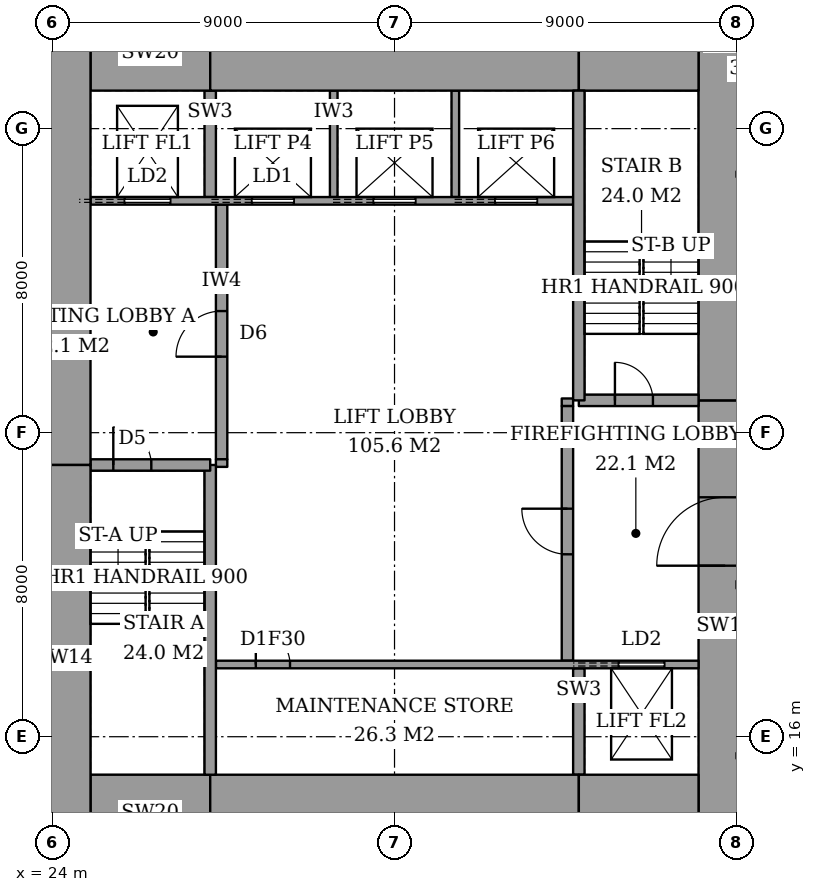
"""IFC4 building model, lengths in metres.
Left out: names, types, materials, properties, quantities, classifications, styles, units other than length and angle.
Written with IfcOpenShell. Run it as: python <this file> out.ifc"""

import sys

from ifc_helpers import new_model, si_unit, direction, frame, frame_2d, origin, place, context, subcontext, project, spatial, rectangle, extrude, element, fill, save


model = new_model("IFC4")
c1 = context("Model", 3, precision=1e-05, world=origin(), true_north=direction((0.0, 1.0)))
c2 = subcontext(c1, "Body", "Model", "MODEL_VIEW")
j1 = project(units=[si_unit("LENGTHUNIT", "METRE"), si_unit("PLANEANGLEUNIT", "RADIAN")], contexts=[c1])
p1 = place(None, origin())
s1 = spatial("IfcSite", under=j1, at=p1, CompositionType="ELEMENT")
p2 = place(p1, origin())
s2 = spatial("IfcBuilding", under=s1, at=p2, CompositionType="ELEMENT")
p3 = place(p2, frame((0.0, 0.0, 266.4)))
s3 = spatial("IfcBuildingStorey", under=s2, at=p3, CompositionType="ELEMENT", Elevation=266.4)
p4 = place(p3, frame((25.0, 14.0, 0.0), z_axis=(0.0, 0.0, 1.0), x_axis=(1.0, 0.0, 0.0)))
e1 = element("IfcWall", 1, at=p4, inside=s3, PredefinedType="SHEAR", context=c2, shape_type="SweptSolid", body=[
    extrude(rectangle(XDim=3.15, YDim=2.0, at=frame_2d((1.575, 0.0))), origin(), (0.0, 0.0, 1.0), 3.6),
])
p5 = place(p3, frame((28.15, 14.0, 0.0), z_axis=(0.0, 0.0, 1.0), x_axis=(1.0, 0.0, 0.0)))
e2 = element("IfcWall", 2, at=p5, inside=s3, PredefinedType="SHEAR", context=c2, shape_type="SweptSolid", body=[
    extrude(rectangle(XDim=9.7, YDim=2.0, at=frame_2d((4.85, 0.0))), origin(), (0.0, 0.0, 1.0), 3.6),
])
for number, where, z_axis, x_axis in (
    (3, (37.85, 14.0, 0.0), (0.0, 0.0, 1.0), (1.0, 0.0, 0.0)),
    (4, (25.0, 34.0, 0.0), (0.0, 0.0, 1.0), (1.0, 0.0, 0.0)),
):
    element("IfcWall", number, at=place(p3, frame(where, z_axis=z_axis, x_axis=x_axis)), inside=s3, PredefinedType="SHEAR", context=c2, shape_type="SweptSolid", body=[
        extrude(rectangle(XDim=3.15, YDim=2.0, at=frame_2d((1.575, 0.0))), origin(), (0.0, 0.0, 1.0), 3.6),
    ])
p6 = place(p3, frame((28.15, 34.0, 0.0), z_axis=(0.0, 0.0, 1.0), x_axis=(1.0, 0.0, 0.0)))
e5 = element("IfcWall", 5, at=p6, inside=s3, PredefinedType="SHEAR", context=c2, shape_type="SweptSolid", body=[
    extrude(rectangle(XDim=9.7, YDim=2.0, at=frame_2d((4.85, 0.0))), origin(), (0.0, 0.0, 1.0), 3.6),
])
p7 = place(p3, frame((37.85, 34.0, 0.0), z_axis=(0.0, 0.0, 1.0), x_axis=(1.0, 0.0, 0.0)))
e6 = element("IfcWall", 6, at=p7, inside=s3, PredefinedType="SHEAR", context=c2, shape_type="SweptSolid", body=[
    extrude(rectangle(XDim=3.15, YDim=2.0, at=frame_2d((1.575, 0.0))), origin(), (0.0, 0.0, 1.0), 3.6),
])
p8 = place(p3, frame((24.3, 13.0, 0.0), z_axis=(0.0, 0.0, 1.0), x_axis=(0.0, 1.0, 0.0)))
e7 = element("IfcWall", 7, at=p8, inside=s3, PredefinedType="SHEAR", context=c2, shape_type="SweptSolid", body=[
    extrude(rectangle(XDim=10.15, YDim=1.4, at=frame_2d((5.075, 0.0))), origin(), (0.0, 0.0, 1.0), 3.6),
])
p9 = place(p3, frame((24.3, 23.15, 0.0), z_axis=(0.0, 0.0, 1.0), x_axis=(0.0, 1.0, 0.0)))
e8 = element("IfcWall", 8, at=p9, inside=s3, PredefinedType="SHEAR", context=c2, shape_type="SweptSolid", body=[
    extrude(rectangle(XDim=11.85, YDim=1.4, at=frame_2d((5.925, 0.0))), origin(), (0.0, 0.0, 1.0), 3.6),
])
p10 = place(p3, frame((41.7, 13.0, 0.0), z_axis=(0.0, 0.0, 1.0), x_axis=(0.0, 1.0, 0.0)))
e9 = element("IfcWall", 9, at=p10, inside=s3, PredefinedType="SHEAR", context=c2, shape_type="SweptSolid", body=[
    extrude(rectangle(XDim=11.85, YDim=1.4, at=frame_2d((5.925, 0.0))), origin(), (0.0, 0.0, 1.0), 3.6),
])
p11 = place(p10, frame((7.5, 0.0, 0.0)))
e10 = element("IfcOpeningElement", 10, at=p11, cuts=e9, PredefinedType="OPENING", context=c2, shape_type="SweptSolid", body=[
    extrude(rectangle(XDim=1.8, YDim=2.4, at=frame_2d((0.9, 1.2))), frame((0.0, 0.71, 0.0), z_axis=(0.0, -1.0, 0.0), x_axis=(1.0, 0.0, 0.0)), (0.0, 0.0, 1.0), 1.42),
])
p12 = place(p3, frame((41.7, 24.85, 0.0), z_axis=(0.0, 0.0, 1.0), x_axis=(0.0, 1.0, 0.0)))
e11 = element("IfcWall", 11, at=p12, inside=s3, PredefinedType="SHEAR", context=c2, shape_type="SweptSolid", body=[
    extrude(rectangle(XDim=10.15, YDim=1.4, at=frame_2d((5.075, 0.0))), origin(), (0.0, 0.0, 1.0), 3.6),
])
p13 = place(p3, frame((28.15, 15.0, 0.0), z_axis=(0.0, 0.0, 1.0), x_axis=(0.0, 1.0, 0.0)))
e12 = element("IfcWall", 12, at=p13, inside=s3, PredefinedType="SHEAR", context=c2, shape_type="SweptSolid", body=[
    extrude(rectangle(XDim=8.15, YDim=0.3, at=frame_2d((4.075, 0.0))), origin(), (0.0, 0.0, 1.0), 3.6),
])
p14 = place(p3, frame((25.0, 23.15, 0.0), z_axis=(0.0, 0.0, 1.0), x_axis=(1.0, 0.0, 0.0)))
e13 = element("IfcWall", 13, at=p14, inside=s3, PredefinedType="SHEAR", context=c2, shape_type="SweptSolid", body=[
    extrude(rectangle(XDim=3.15, YDim=0.3, at=frame_2d((1.575, 0.0))), origin(), (0.0, 0.0, 1.0), 3.6),
])
p15 = place(p14, frame((0.6, 0.0, 0.0)))
e14 = element("IfcOpeningElement", 14, at=p15, cuts=e13, PredefinedType="OPENING", context=c2, shape_type="SweptSolid", body=[
    extrude(rectangle(XDim=1.0, YDim=2.1, at=frame_2d((0.5, 1.05))), frame((0.0, 0.16, 0.0), z_axis=(0.0, -1.0, 0.0), x_axis=(1.0, 0.0, 0.0)), (0.0, 0.0, 1.0), 0.32),
])
p16 = place(p3, frame((37.85, 24.85, 0.0), z_axis=(0.0, 0.0, 1.0), x_axis=(0.0, 1.0, 0.0)))
e15 = element("IfcWall", 15, at=p16, inside=s3, PredefinedType="SHEAR", context=c2, shape_type="SweptSolid", body=[
    extrude(rectangle(XDim=8.15, YDim=0.3, at=frame_2d((4.075, 0.0))), origin(), (0.0, 0.0, 1.0), 3.6),
])
p17 = place(p3, frame((37.85, 24.85, 0.0), z_axis=(0.0, 0.0, 1.0), x_axis=(1.0, 0.0, 0.0)))
e16 = element("IfcWall", 16, at=p17, inside=s3, PredefinedType="SHEAR", context=c2, shape_type="SweptSolid", body=[
    extrude(rectangle(XDim=3.15, YDim=0.3, at=frame_2d((1.575, 0.0))), origin(), (0.0, 0.0, 1.0), 3.6),
])
p18 = place(p17, frame((0.95, 0.0, 0.0)))
e17 = element("IfcOpeningElement", 17, at=p18, cuts=e16, PredefinedType="OPENING", context=c2, shape_type="SweptSolid", body=[
    extrude(rectangle(XDim=1.0, YDim=2.1, at=frame_2d((0.5, 1.05))), frame((0.0, 0.16, 0.0), z_axis=(0.0, -1.0, 0.0), x_axis=(1.0, 0.0, 0.0)), (0.0, 0.0, 1.0), 0.32),
])
p19 = place(p3, frame((28.45, 23.3, 0.0), z_axis=(0.0, 0.0, 1.0), x_axis=(0.0, 1.0, 0.0)))
e18 = element("IfcWall", 18, at=p19, inside=s3, PredefinedType="PARTITIONING", context=c2, shape_type="SweptSolid", body=[
    extrude(rectangle(XDim=6.7, YDim=0.3, at=frame_2d((3.35, 0.0))), origin(), (0.0, 0.0, 1.0), 3.6),
])
p20 = place(p19, frame((2.7, 0.0, 0.0)))
e19 = element("IfcOpeningElement", 19, at=p20, cuts=e18, PredefinedType="OPENING", context=c2, shape_type="SweptSolid", body=[
    extrude(rectangle(XDim=1.2, YDim=2.1, at=frame_2d((0.6, 1.05))), frame((0.0, 0.16, 0.0), z_axis=(0.0, -1.0, 0.0), x_axis=(1.0, 0.0, 0.0)), (0.0, 0.0, 1.0), 0.32),
])
p21 = place(p3, frame((37.55, 18.0, 0.0), z_axis=(0.0, 0.0, 1.0), x_axis=(0.0, 1.0, 0.0)))
e20 = element("IfcWall", 20, at=p21, inside=s3, PredefinedType="PARTITIONING", context=c2, shape_type="SweptSolid", body=[
    extrude(rectangle(XDim=6.7, YDim=0.3, at=frame_2d((3.35, 0.0))), origin(), (0.0, 0.0, 1.0), 3.6),
])
p22 = place(p21, frame((2.8, 0.0, 0.0)))
e21 = element("IfcOpeningElement", 21, at=p22, cuts=e20, PredefinedType="OPENING", context=c2, shape_type="SweptSolid", body=[
    extrude(rectangle(XDim=1.2, YDim=2.1, at=frame_2d((0.6, 1.05))), frame((0.0, 0.16, 0.0), z_axis=(0.0, -1.0, 0.0), x_axis=(1.0, 0.0, 0.0)), (0.0, 0.0, 1.0), 0.32),
])
p23 = place(p3, frame((28.3, 17.9, 0.0), z_axis=(0.0, 0.0, 1.0), x_axis=(1.0, 0.0, 0.0)))
e22 = element("IfcWall", 22, at=p23, inside=s3, PredefinedType="PARTITIONING", context=c2, shape_type="SweptSolid", body=[
    extrude(rectangle(XDim=12.7, YDim=0.2, at=frame_2d((6.35, 0.0))), origin(), (0.0, 0.0, 1.0), 3.6),
])
p24 = place(p23, frame((1.05, 0.0, 0.0)))
e23 = element("IfcOpeningElement", 23, at=p24, cuts=e22, PredefinedType="OPENING", context=c2, shape_type="SweptSolid", body=[
    extrude(rectangle(XDim=0.9, YDim=2.1, at=frame_2d((0.45, 1.05))), frame((0.0, 0.11, 0.0), z_axis=(0.0, -1.0, 0.0), x_axis=(1.0, 0.0, 0.0)), (0.0, 0.0, 1.0), 0.22),
])
p25 = place(p23, frame((10.6, 0.0, 0.0)))
e24 = element("IfcOpeningElement", 24, at=p25, cuts=e22, PredefinedType="OPENING", context=c2, shape_type="SweptSolid", body=[
    extrude(rectangle(XDim=1.2, YDim=2.1, at=frame_2d((0.6, 1.05))), frame((0.0, 0.11, 0.0), z_axis=(0.0, -1.0, 0.0), x_axis=(1.0, 0.0, 0.0)), (0.0, 0.0, 1.0), 0.22),
])
p26 = place(p3, frame((25.0, 30.1, 0.0), z_axis=(0.0, 0.0, 1.0), x_axis=(1.0, 0.0, 0.0)))
e25 = element("IfcWall", 25, at=p26, inside=s3, PredefinedType="PARTITIONING", context=c2, shape_type="SweptSolid", body=[
    extrude(rectangle(XDim=12.7, YDim=0.2, at=frame_2d((6.35, 0.0))), origin(), (0.0, 0.0, 1.0), 3.6),
])
p27 = place(p26, frame((4.25, 0.0, 0.0)))
e26 = element("IfcOpeningElement", 26, at=p27, cuts=e25, PredefinedType="OPENING", context=c2, shape_type="SweptSolid", body=[
    extrude(rectangle(XDim=1.1, YDim=2.1, at=frame_2d((0.55, 1.05))), frame((0.0, 0.11, 0.0), z_axis=(0.0, -1.0, 0.0), x_axis=(1.0, 0.0, 0.0)), (0.0, 0.0, 1.0), 0.22),
])
p28 = place(p26, frame((7.45, 0.0, 0.0)))
e27 = element("IfcOpeningElement", 27, at=p28, cuts=e25, PredefinedType="OPENING", context=c2, shape_type="SweptSolid", body=[
    extrude(rectangle(XDim=1.1, YDim=2.1, at=frame_2d((0.55, 1.05))), frame((0.0, 0.11, 0.0), z_axis=(0.0, -1.0, 0.0), x_axis=(1.0, 0.0, 0.0)), (0.0, 0.0, 1.0), 0.22),
])
p29 = place(p26, frame((10.65, 0.0, 0.0)))
e28 = element("IfcOpeningElement", 28, at=p29, cuts=e25, PredefinedType="OPENING", context=c2, shape_type="SweptSolid", body=[
    extrude(rectangle(XDim=1.1, YDim=2.1, at=frame_2d((0.55, 1.05))), frame((0.0, 0.11, 0.0), z_axis=(0.0, -1.0, 0.0), x_axis=(1.0, 0.0, 0.0)), (0.0, 0.0, 1.0), 0.22),
])
p30 = place(p26, frame((0.9, 0.0, 0.0)))
e29 = element("IfcOpeningElement", 29, at=p30, cuts=e25, PredefinedType="OPENING", context=c2, shape_type="SweptSolid", body=[
    extrude(rectangle(XDim=1.2, YDim=2.1, at=frame_2d((0.6, 1.05))), frame((0.0, 0.11, 0.0), z_axis=(0.0, -1.0, 0.0), x_axis=(1.0, 0.0, 0.0)), (0.0, 0.0, 1.0), 0.22),
])
p31 = place(p3, frame((37.85, 15.0, 0.0), z_axis=(0.0, 0.0, 1.0), x_axis=(0.0, 1.0, 0.0)))
e30 = element("IfcWall", 30, at=p31, inside=s3, PredefinedType="SHEAR", context=c2, shape_type="SweptSolid", body=[
    extrude(rectangle(XDim=2.8, YDim=0.3, at=frame_2d((1.4, 0.0))), origin(), (0.0, 0.0, 1.0), 3.6),
])
for number, where, z_axis, x_axis in (
    (31, (31.4, 30.2, 0.0), (0.0, 0.0, 1.0), (0.0, 1.0, 0.0)),
    (32, (34.6, 30.2, 0.0), (0.0, 0.0, 1.0), (0.0, 1.0, 0.0)),
):
    element("IfcWall", number, at=place(p3, frame(where, z_axis=z_axis, x_axis=x_axis)), inside=s3, PredefinedType="PARTITIONING", context=c2, shape_type="SweptSolid", body=[
        extrude(rectangle(XDim=2.8, YDim=0.2, at=frame_2d((1.4, 0.0))), origin(), (0.0, 0.0, 1.0), 3.6),
    ])
p32 = place(p3, frame((28.15, 30.2, 0.0), z_axis=(0.0, 0.0, 1.0), x_axis=(0.0, 1.0, 0.0)))
e33 = element("IfcWall", 33, at=p32, inside=s3, PredefinedType="SHEAR", context=c2, shape_type="SweptSolid", body=[
    extrude(rectangle(XDim=2.8, YDim=0.3, at=frame_2d((1.4, 0.0))), origin(), (0.0, 0.0, 1.0), 3.6),
])
for number, where, z_axis, x_axis in (
    (34, (28.3, 23.2, 0.0), (0.0, 0.0, 1.0), (1.0, 0.0, 0.0)),
    (35, (37.4, 24.8, 0.0), (0.0, 0.0, 1.0), (1.0, 0.0, 0.0)),
):
    element("IfcWall", number, at=place(p3, frame(where, z_axis=z_axis, x_axis=x_axis)), inside=s3, PredefinedType="PARTITIONING", context=c2, shape_type="SweptSolid", body=[
        extrude(rectangle(XDim=0.3, YDim=0.2, at=frame_2d((0.15, 0.0))), origin(), (0.0, 0.0, 1.0), 3.6),
    ])
p33 = place(p15, origin())
e36 = element("IfcDoor", 36, at=p33, inside=s3, OperationType="SINGLE_SWING_RIGHT", PredefinedType="DOOR", context=c2, shape_type="SweptSolid", body=[
    extrude(rectangle(XDim=1.0, YDim=2.1, at=frame_2d((0.5, 1.05))), frame((0.0, 0.025, 0.0), z_axis=(0.0, -1.0, 0.0), x_axis=(1.0, 0.0, 0.0)), (0.0, 0.0, 1.0), 0.05),
])
fill(e14, e36)
p34 = place(p18, origin())
e37 = element("IfcDoor", 37, at=p34, inside=s3, OperationType="SINGLE_SWING_RIGHT", PredefinedType="DOOR", context=c2, shape_type="SweptSolid", body=[
    extrude(rectangle(XDim=1.0, YDim=2.1, at=frame_2d((0.5, 1.05))), frame((0.0, 0.025, 0.0), z_axis=(0.0, -1.0, 0.0), x_axis=(1.0, 0.0, 0.0)), (0.0, 0.0, 1.0), 0.05),
])
fill(e17, e37)
p35 = place(p20, origin())
e38 = element("IfcDoor", 38, at=p35, inside=s3, OperationType="SINGLE_SWING_RIGHT", PredefinedType="DOOR", context=c2, shape_type="SweptSolid", body=[
    extrude(rectangle(XDim=1.2, YDim=2.1, at=frame_2d((0.6, 1.05))), frame((0.0, 0.025, 0.0), z_axis=(0.0, -1.0, 0.0), x_axis=(1.0, 0.0, 0.0)), (0.0, 0.0, 1.0), 0.05),
])
fill(e19, e38)
p36 = place(p22, origin())
e39 = element("IfcDoor", 39, at=p36, inside=s3, OperationType="SINGLE_SWING_LEFT", PredefinedType="DOOR", context=c2, shape_type="SweptSolid", body=[
    extrude(rectangle(XDim=1.2, YDim=2.1, at=frame_2d((0.6, 1.05))), frame((0.0, 0.025, 0.0), z_axis=(0.0, -1.0, 0.0), x_axis=(1.0, 0.0, 0.0)), (0.0, 0.0, 1.0), 0.05),
])
fill(e21, e39)
p37 = place(p11, origin())
e40 = element("IfcDoor", 40, at=p37, inside=s3, OperationType="DOUBLE_DOOR_DOUBLE_SWING", PredefinedType="DOOR", context=c2, shape_type="SweptSolid", body=[
    extrude(rectangle(XDim=1.8, YDim=2.4, at=frame_2d((0.9, 1.2))), frame((0.0, 0.025, 0.0), z_axis=(0.0, -1.0, 0.0), x_axis=(1.0, 0.0, 0.0)), (0.0, 0.0, 1.0), 0.05),
])
fill(e10, e40)
p38 = place(p24, origin())
e41 = element("IfcDoor", 41, at=p38, inside=s3, OperationType="SINGLE_SWING_RIGHT", PredefinedType="DOOR", context=c2, shape_type="SweptSolid", body=[
    extrude(rectangle(XDim=0.9, YDim=2.1, at=frame_2d((0.45, 1.05))), frame((0.0, 0.025, 0.0), z_axis=(0.0, -1.0, 0.0), x_axis=(1.0, 0.0, 0.0)), (0.0, 0.0, 1.0), 0.05),
])
fill(e23, e41)
p39 = place(p27, origin())
e42 = element("IfcDoor", 42, at=p39, inside=s3, OperationType="SLIDING_TO_LEFT", PredefinedType="DOOR", context=c2, shape_type="SweptSolid", body=[
    extrude(rectangle(XDim=1.1, YDim=2.1, at=frame_2d((0.55, 1.05))), frame((0.0, 0.025, 0.0), z_axis=(0.0, -1.0, 0.0), x_axis=(1.0, 0.0, 0.0)), (0.0, 0.0, 1.0), 0.05),
])
fill(e26, e42)
p40 = place(p28, origin())
e43 = element("IfcDoor", 43, at=p40, inside=s3, OperationType="SLIDING_TO_LEFT", PredefinedType="DOOR", context=c2, shape_type="SweptSolid", body=[
    extrude(rectangle(XDim=1.1, YDim=2.1, at=frame_2d((0.55, 1.05))), frame((0.0, 0.025, 0.0), z_axis=(0.0, -1.0, 0.0), x_axis=(1.0, 0.0, 0.0)), (0.0, 0.0, 1.0), 0.05),
])
fill(e27, e43)
p41 = place(p29, origin())
e44 = element("IfcDoor", 44, at=p41, inside=s3, OperationType="SLIDING_TO_LEFT", PredefinedType="DOOR", context=c2, shape_type="SweptSolid", body=[
    extrude(rectangle(XDim=1.1, YDim=2.1, at=frame_2d((0.55, 1.05))), frame((0.0, 0.025, 0.0), z_axis=(0.0, -1.0, 0.0), x_axis=(1.0, 0.0, 0.0)), (0.0, 0.0, 1.0), 0.05),
])
fill(e28, e44)
p42 = place(p30, origin())
e45 = element("IfcDoor", 45, at=p42, inside=s3, OperationType="SLIDING_TO_LEFT", PredefinedType="DOOR", context=c2, shape_type="SweptSolid", body=[
    extrude(rectangle(XDim=1.2, YDim=2.1, at=frame_2d((0.6, 1.05))), frame((0.0, 0.025, 0.0), z_axis=(0.0, -1.0, 0.0), x_axis=(1.0, 0.0, 0.0)), (0.0, 0.0, 1.0), 0.05),
])
fill(e29, e45)
p43 = place(p25, origin())
e46 = element("IfcDoor", 46, at=p43, inside=s3, OperationType="SLIDING_TO_LEFT", PredefinedType="DOOR", context=c2, shape_type="SweptSolid", body=[
    extrude(rectangle(XDim=1.2, YDim=2.1, at=frame_2d((0.6, 1.05))), frame((0.0, 0.025, 0.0), z_axis=(0.0, -1.0, 0.0), x_axis=(1.0, 0.0, 0.0)), (0.0, 0.0, 1.0), 0.05),
])
fill(e24, e46)
save(model, sys.argv[1])
